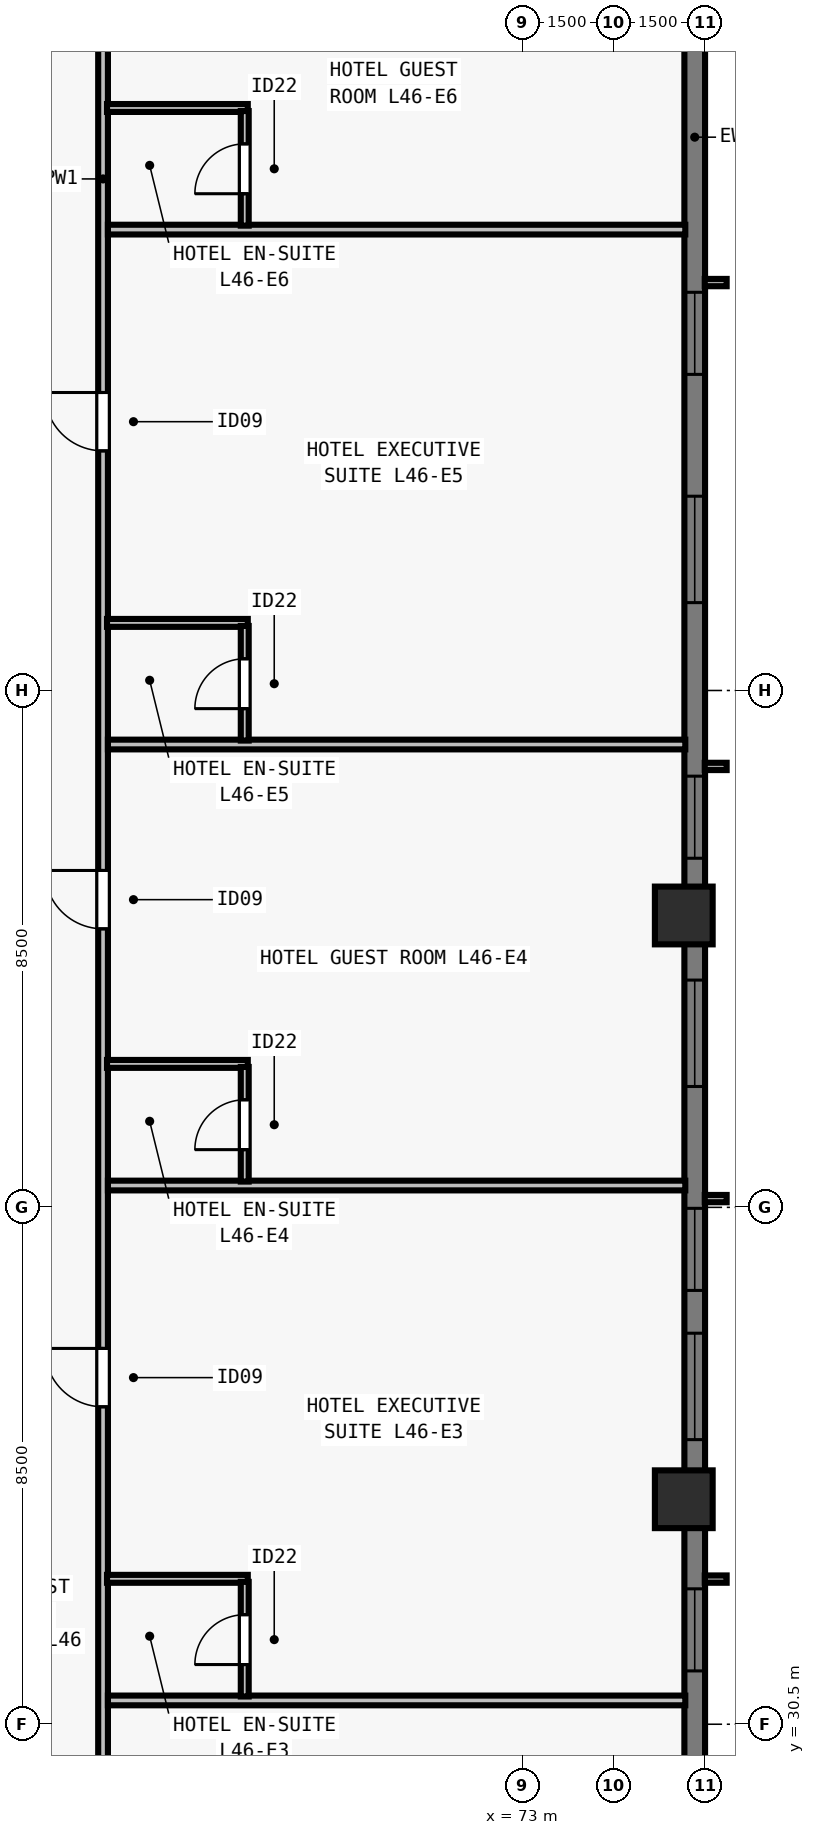
"""IFC4 building model, lengths in metres.
Left out: names, types, materials, properties, quantities, classifications, styles, units other than length and angle.
Written with IfcOpenShell. Run it as: python <this file> out.ifc"""

import sys

from ifc_helpers import new_model, si_unit, direction, frame, frame_2d, origin, origin_2d, place, context, subcontext, project, spatial, rectangle, extrude, element, fill, save


model = new_model("IFC4")
c1 = context("Model", 3, precision=1e-05, world=origin(), true_north=direction((0.0, 1.0)))
c2 = subcontext(c1, "Body", "Model", "MODEL_VIEW")
j1 = project(units=[si_unit("LENGTHUNIT", "METRE"), si_unit("PLANEANGLEUNIT", "RADIAN")], contexts=[c1])
p1 = place(None, origin())
s1 = spatial("IfcSite", under=j1, at=p1, CompositionType="ELEMENT")
p2 = place(p1, origin())
s2 = spatial("IfcBuilding", under=s1, at=p2, CompositionType="ELEMENT")
p3 = place(p2, frame((0.0, 0.0, 169.0)))
s3 = spatial("IfcBuildingStorey", under=s2, at=p3, CompositionType="ELEMENT", Elevation=169.0)
for number, where, z_axis, x_axis in (
    (1, (75.65, 34.2, 0.0), (0.0, 0.0, 1.0), (0.0, 1.0, 0.0)),
    (2, (75.65, 43.8, 0.0), (0.0, 0.0, 1.0), (0.0, 1.0, 0.0)),
):
    element("IfcColumn", number, at=place(p3, frame(where, z_axis=z_axis, x_axis=x_axis)), inside=s3, PredefinedType="COLUMN", context=c2, shape_type="SweptSolid", body=[
        extrude(rectangle(XDim=0.95, YDim=0.95, at=origin_2d()), origin(), (0.0, 0.0, 1.0), 3.5),
    ])
p4 = place(p3, frame((75.83, 59.0, 0.0), z_axis=(0.0, 0.0, 1.0), x_axis=(0.0, -1.0, 0.0)))
e3 = element("IfcWall", 3, at=p4, inside=s3, PredefinedType="SOLIDWALL", context=c2, shape_type="SweptSolid", body=[
    extrude(rectangle(XDim=39.682, YDim=0.34, at=frame_2d((19.841, 0.0))), origin(), (0.0, 0.0, 1.0), 3.28),
])
p5 = place(p4, frame((4.952, 0.0, 0.8)))
e4 = element("IfcOpeningElement", 4, at=p5, cuts=e3, PredefinedType="OPENING", context=c2, shape_type="SweptSolid", body=[
    extrude(rectangle(XDim=1.35, YDim=1.66, at=frame_2d((0.675, 0.83))), frame((0.0, 0.18, 0.0), z_axis=(0.0, -1.0, 0.0), x_axis=(1.0, 0.0, 0.0)), (0.0, 0.0, 1.0), 0.36),
])
p6 = place(p4, frame((8.305, 0.0, 0.8)))
e5 = element("IfcOpeningElement", 5, at=p6, cuts=e3, PredefinedType="OPENING", context=c2, shape_type="SweptSolid", body=[
    extrude(rectangle(XDim=1.75, YDim=1.66, at=frame_2d((0.875, 0.83))), frame((0.0, 0.18, 0.0), z_axis=(0.0, -1.0, 0.0), x_axis=(1.0, 0.0, 0.0)), (0.0, 0.0, 1.0), 0.36),
])
p7 = place(p4, frame((12.909, 0.0, 0.8)))
e6 = element("IfcOpeningElement", 6, at=p7, cuts=e3, PredefinedType="OPENING", context=c2, shape_type="SweptSolid", body=[
    extrude(rectangle(XDim=1.35, YDim=1.66, at=frame_2d((0.675, 0.83))), frame((0.0, 0.18, 0.0), z_axis=(0.0, -1.0, 0.0), x_axis=(1.0, 0.0, 0.0)), (0.0, 0.0, 1.0), 0.36),
])
p8 = place(p4, frame((16.262, 0.0, 0.8)))
e7 = element("IfcOpeningElement", 7, at=p8, cuts=e3, PredefinedType="OPENING", context=c2, shape_type="SweptSolid", body=[
    extrude(rectangle(XDim=1.75, YDim=1.66, at=frame_2d((0.875, 0.83))), frame((0.0, 0.18, 0.0), z_axis=(0.0, -1.0, 0.0), x_axis=(1.0, 0.0, 0.0)), (0.0, 0.0, 1.0), 0.36),
])
p9 = place(p4, frame((20.016, 0.0, 0.8)))
e8 = element("IfcOpeningElement", 8, at=p9, cuts=e3, PredefinedType="OPENING", context=c2, shape_type="SweptSolid", body=[
    extrude(rectangle(XDim=1.35, YDim=1.66, at=frame_2d((0.675, 0.83))), frame((0.0, 0.18, 0.0), z_axis=(0.0, -1.0, 0.0), x_axis=(1.0, 0.0, 0.0)), (0.0, 0.0, 1.0), 0.36),
])
p10 = place(p4, frame((22.07, 0.0, 0.8)))
e9 = element("IfcOpeningElement", 9, at=p10, cuts=e3, PredefinedType="OPENING", context=c2, shape_type="SweptSolid", body=[
    extrude(rectangle(XDim=1.75, YDim=1.66, at=frame_2d((0.875, 0.83))), frame((0.0, 0.18, 0.0), z_axis=(0.0, -1.0, 0.0), x_axis=(1.0, 0.0, 0.0)), (0.0, 0.0, 1.0), 0.36),
])
p11 = place(p4, frame((26.273, 0.0, 0.8)))
e10 = element("IfcOpeningElement", 10, at=p11, cuts=e3, PredefinedType="OPENING", context=c2, shape_type="SweptSolid", body=[
    extrude(rectangle(XDim=1.35, YDim=1.66, at=frame_2d((0.675, 0.83))), frame((0.0, 0.18, 0.0), z_axis=(0.0, -1.0, 0.0), x_axis=(1.0, 0.0, 0.0)), (0.0, 0.0, 1.0), 0.36),
])
p12 = place(p4, frame((29.627, 0.0, 0.8)))
e11 = element("IfcOpeningElement", 11, at=p12, cuts=e3, PredefinedType="OPENING", context=c2, shape_type="SweptSolid", body=[
    extrude(rectangle(XDim=1.75, YDim=1.66, at=frame_2d((0.875, 0.83))), frame((0.0, 0.18, 0.0), z_axis=(0.0, -1.0, 0.0), x_axis=(1.0, 0.0, 0.0)), (0.0, 0.0, 1.0), 0.36),
])
p13 = place(p4, frame((33.38, 0.0, 0.8)))
e12 = element("IfcOpeningElement", 12, at=p13, cuts=e3, PredefinedType="OPENING", context=c2, shape_type="SweptSolid", body=[
    extrude(rectangle(XDim=1.35, YDim=1.66, at=frame_2d((0.675, 0.83))), frame((0.0, 0.18, 0.0), z_axis=(0.0, -1.0, 0.0), x_axis=(1.0, 0.0, 0.0)), (0.0, 0.0, 1.0), 0.36),
])
p14 = place(p4, frame((35.75, 0.0, 0.8)))
e13 = element("IfcOpeningElement", 13, at=p14, cuts=e3, PredefinedType="OPENING", context=c2, shape_type="SweptSolid", body=[
    extrude(rectangle(XDim=0.9, YDim=1.66, at=frame_2d((0.45, 0.83))), frame((0.0, 0.18, 0.0), z_axis=(0.0, -1.0, 0.0), x_axis=(1.0, 0.0, 0.0)), (0.0, 0.0, 1.0), 0.36),
])
p15 = place(p3, frame((66.1, 15.325, 0.0), z_axis=(0.0, 0.0, 1.0), x_axis=(0.0, 1.0, 0.0)))
e14 = element("IfcWall", 14, at=p15, inside=s3, PredefinedType="PARTITIONING", context=c2, shape_type="SweptSolid", body=[
    extrude(rectangle(XDim=47.35, YDim=0.16, at=frame_2d((23.675, 0.0))), origin(), (0.0, 0.0, 1.0), 2.555),
])
p16 = place(p15, frame((5.025, 0.0, 0.0)))
e15 = element("IfcOpeningElement", 15, at=p16, cuts=e14, PredefinedType="OPENING", context=c2, shape_type="SweptSolid", body=[
    extrude(rectangle(XDim=0.96, YDim=2.15, at=frame_2d((0.48, 1.075))), frame((0.0, 0.09, 0.0), z_axis=(0.0, -1.0, 0.0), x_axis=(1.0, 0.0, 0.0)), (0.0, 0.0, 1.0), 0.18),
])
p17 = place(p15, frame((12.535, 0.0, 0.0)))
e16 = element("IfcOpeningElement", 16, at=p17, cuts=e14, PredefinedType="OPENING", context=c2, shape_type="SweptSolid", body=[
    extrude(rectangle(XDim=0.96, YDim=2.15, at=frame_2d((0.48, 1.075))), frame((0.0, 0.09, 0.0), z_axis=(0.0, -1.0, 0.0), x_axis=(1.0, 0.0, 0.0)), (0.0, 0.0, 1.0), 0.18),
])
p18 = place(p15, frame((20.395, 0.0, 0.0)))
e17 = element("IfcOpeningElement", 17, at=p18, cuts=e14, PredefinedType="OPENING", context=c2, shape_type="SweptSolid", body=[
    extrude(rectangle(XDim=0.96, YDim=2.15, at=frame_2d((0.48, 1.075))), frame((0.0, 0.09, 0.0), z_axis=(0.0, -1.0, 0.0), x_axis=(1.0, 0.0, 0.0)), (0.0, 0.0, 1.0), 0.18),
])
p19 = place(p15, frame((28.255, 0.0, 0.0)))
e18 = element("IfcOpeningElement", 18, at=p19, cuts=e14, PredefinedType="OPENING", context=c2, shape_type="SweptSolid", body=[
    extrude(rectangle(XDim=0.96, YDim=2.15, at=frame_2d((0.48, 1.075))), frame((0.0, 0.09, 0.0), z_axis=(0.0, -1.0, 0.0), x_axis=(1.0, 0.0, 0.0)), (0.0, 0.0, 1.0), 0.18),
])
p20 = place(p15, frame((36.115, 0.0, 0.0)))
e19 = element("IfcOpeningElement", 19, at=p20, cuts=e14, PredefinedType="OPENING", context=c2, shape_type="SweptSolid", body=[
    extrude(rectangle(XDim=0.96, YDim=2.15, at=frame_2d((0.48, 1.075))), frame((0.0, 0.09, 0.0), z_axis=(0.0, -1.0, 0.0), x_axis=(1.0, 0.0, 0.0)), (0.0, 0.0, 1.0), 0.18),
])
p21 = place(p15, frame((44.1, 0.0, 0.0)))
e20 = element("IfcOpeningElement", 20, at=p21, cuts=e14, PredefinedType="OPENING", context=c2, shape_type="SweptSolid", body=[
    extrude(rectangle(XDim=0.96, YDim=2.15, at=frame_2d((0.48, 1.075))), frame((0.0, 0.09, 0.0), z_axis=(0.0, -1.0, 0.0), x_axis=(1.0, 0.0, 0.0)), (0.0, 0.0, 1.0), 0.18),
])
p22 = place(p3, frame((66.18, 30.891, 0.0), z_axis=(0.0, 0.0, 1.0), x_axis=(1.0, 0.0, 0.0)))
e21 = element("IfcWall", 21, at=p22, inside=s3, PredefinedType="PARTITIONING", context=c2, shape_type="SweptSolid", body=[
    extrude(rectangle(XDim=9.495, YDim=0.16, at=frame_2d((4.748, 0.0))), origin(), (0.0, 0.0, 1.0), 3.28),
])
p23 = place(p3, frame((66.165, 32.891, 0.0), z_axis=(0.0, 0.0, 1.0), x_axis=(1.0, 0.0, 0.0)))
e22 = element("IfcWall", 22, at=p23, inside=s3, PredefinedType="PLUMBINGWALL", context=c2, shape_type="SweptSolid", body=[
    extrude(rectangle(XDim=2.315, YDim=0.13, at=frame_2d((1.157, 0.0))), origin(), (0.0, 0.0, 1.0), 3.28),
])
p24 = place(p3, frame((68.43, 30.956, 0.0), z_axis=(0.0, 0.0, 1.0), x_axis=(0.0, 1.0, 0.0)))
e23 = element("IfcWall", 23, at=p24, inside=s3, PredefinedType="PLUMBINGWALL", context=c2, shape_type="SweptSolid", body=[
    extrude(rectangle(XDim=1.885, YDim=0.13, at=frame_2d((0.942, 0.0))), origin(), (0.0, 0.0, 1.0), 3.28),
])
p25 = place(p24, frame((0.525, 0.0, 0.0)))
e24 = element("IfcOpeningElement", 24, at=p25, cuts=e23, PredefinedType="OPENING", context=c2, shape_type="SweptSolid", body=[
    extrude(rectangle(XDim=0.82, YDim=2.1, at=frame_2d((0.41, 1.05))), frame((0.0, 0.075, 0.0), z_axis=(0.0, -1.0, 0.0), x_axis=(1.0, 0.0, 0.0)), (0.0, 0.0, 1.0), 0.15),
])
p26 = place(p3, frame((66.18, 39.359, 0.0), z_axis=(0.0, 0.0, 1.0), x_axis=(1.0, 0.0, 0.0)))
e25 = element("IfcWall", 25, at=p26, inside=s3, PredefinedType="PARTITIONING", context=c2, shape_type="SweptSolid", body=[
    extrude(rectangle(XDim=9.495, YDim=0.16, at=frame_2d((4.748, 0.0))), origin(), (0.0, 0.0, 1.0), 3.28),
])
p27 = place(p3, frame((66.165, 41.359, 0.0), z_axis=(0.0, 0.0, 1.0), x_axis=(1.0, 0.0, 0.0)))
e26 = element("IfcWall", 26, at=p27, inside=s3, PredefinedType="PLUMBINGWALL", context=c2, shape_type="SweptSolid", body=[
    extrude(rectangle(XDim=2.315, YDim=0.13, at=frame_2d((1.157, 0.0))), origin(), (0.0, 0.0, 1.0), 3.28),
])
p28 = place(p3, frame((68.43, 39.424, 0.0), z_axis=(0.0, 0.0, 1.0), x_axis=(0.0, 1.0, 0.0)))
e27 = element("IfcWall", 27, at=p28, inside=s3, PredefinedType="PLUMBINGWALL", context=c2, shape_type="SweptSolid", body=[
    extrude(rectangle(XDim=1.885, YDim=0.13, at=frame_2d((0.942, 0.0))), origin(), (0.0, 0.0, 1.0), 3.28),
])
p29 = place(p28, frame((0.525, 0.0, 0.0)))
e28 = element("IfcOpeningElement", 28, at=p29, cuts=e27, PredefinedType="OPENING", context=c2, shape_type="SweptSolid", body=[
    extrude(rectangle(XDim=0.82, YDim=2.1, at=frame_2d((0.41, 1.05))), frame((0.0, 0.075, 0.0), z_axis=(0.0, -1.0, 0.0), x_axis=(1.0, 0.0, 0.0)), (0.0, 0.0, 1.0), 0.15),
])
p30 = place(p3, frame((66.18, 46.611, 0.0), z_axis=(0.0, 0.0, 1.0), x_axis=(1.0, 0.0, 0.0)))
e29 = element("IfcWall", 29, at=p30, inside=s3, PredefinedType="PARTITIONING", context=c2, shape_type="SweptSolid", body=[
    extrude(rectangle(XDim=9.495, YDim=0.16, at=frame_2d((4.748, 0.0))), origin(), (0.0, 0.0, 1.0), 3.28),
])
p31 = place(p3, frame((66.165, 48.611, 0.0), z_axis=(0.0, 0.0, 1.0), x_axis=(1.0, 0.0, 0.0)))
e30 = element("IfcWall", 30, at=p31, inside=s3, PredefinedType="PLUMBINGWALL", context=c2, shape_type="SweptSolid", body=[
    extrude(rectangle(XDim=2.315, YDim=0.13, at=frame_2d((1.157, 0.0))), origin(), (0.0, 0.0, 1.0), 3.28),
])
p32 = place(p3, frame((68.43, 46.677, 0.0), z_axis=(0.0, 0.0, 1.0), x_axis=(0.0, 1.0, 0.0)))
e31 = element("IfcWall", 31, at=p32, inside=s3, PredefinedType="PLUMBINGWALL", context=c2, shape_type="SweptSolid", body=[
    extrude(rectangle(XDim=1.885, YDim=0.13, at=frame_2d((0.942, 0.0))), origin(), (0.0, 0.0, 1.0), 3.28),
])
p33 = place(p32, frame((0.525, 0.0, 0.0)))
e32 = element("IfcOpeningElement", 32, at=p33, cuts=e31, PredefinedType="OPENING", context=c2, shape_type="SweptSolid", body=[
    extrude(rectangle(XDim=0.82, YDim=2.1, at=frame_2d((0.41, 1.05))), frame((0.0, 0.075, 0.0), z_axis=(0.0, -1.0, 0.0), x_axis=(1.0, 0.0, 0.0)), (0.0, 0.0, 1.0), 0.15),
])
p34 = place(p3, frame((66.18, 55.079, 0.0), z_axis=(0.0, 0.0, 1.0), x_axis=(1.0, 0.0, 0.0)))
e33 = element("IfcWall", 33, at=p34, inside=s3, PredefinedType="PARTITIONING", context=c2, shape_type="SweptSolid", body=[
    extrude(rectangle(XDim=9.495, YDim=0.16, at=frame_2d((4.748, 0.0))), origin(), (0.0, 0.0, 1.0), 2.896),
])
p35 = place(p3, frame((66.165, 57.079, 0.0), z_axis=(0.0, 0.0, 1.0), x_axis=(1.0, 0.0, 0.0)))
e34 = element("IfcWall", 34, at=p35, inside=s3, PredefinedType="PLUMBINGWALL", context=c2, shape_type="SweptSolid", body=[
    extrude(rectangle(XDim=2.315, YDim=0.13, at=frame_2d((1.157, 0.0))), origin(), (0.0, 0.0, 1.0), 3.28),
])
p36 = place(p3, frame((68.43, 55.144, 0.0), z_axis=(0.0, 0.0, 1.0), x_axis=(0.0, 1.0, 0.0)))
e35 = element("IfcWall", 35, at=p36, inside=s3, PredefinedType="PLUMBINGWALL", context=c2, shape_type="SweptSolid", body=[
    extrude(rectangle(XDim=1.885, YDim=0.13, at=frame_2d((0.942, 0.0))), origin(), (0.0, 0.0, 1.0), 3.28),
])
p37 = place(p36, frame((0.525, 0.0, 0.0)))
e36 = element("IfcOpeningElement", 36, at=p37, cuts=e35, PredefinedType="OPENING", context=c2, shape_type="SweptSolid", body=[
    extrude(rectangle(XDim=0.82, YDim=2.1, at=frame_2d((0.41, 1.05))), frame((0.0, 0.075, 0.0), z_axis=(0.0, -1.0, 0.0), x_axis=(1.0, 0.0, 0.0)), (0.0, 0.0, 1.0), 0.15),
])
p38 = place(p5, origin())
e37 = element("IfcWindow", 37, at=p38, inside=s3, PartitioningType="SINGLE_PANEL", PredefinedType="WINDOW", context=c2, shape_type="SweptSolid", body=[
    extrude(rectangle(XDim=1.35, YDim=1.66, at=frame_2d((0.675, 0.83))), frame((0.0, -0.05, 0.0), z_axis=(0.0, -1.0, 0.0), x_axis=(1.0, 0.0, 0.0)), (0.0, 0.0, 1.0), 0.06),
])
fill(e4, e37)
p39 = place(p6, origin())
e38 = element("IfcWindow", 38, at=p39, inside=s3, PartitioningType="SINGLE_PANEL", PredefinedType="WINDOW", context=c2, shape_type="SweptSolid", body=[
    extrude(rectangle(XDim=1.75, YDim=1.66, at=frame_2d((0.875, 0.83))), frame((0.0, -0.05, 0.0), z_axis=(0.0, -1.0, 0.0), x_axis=(1.0, 0.0, 0.0)), (0.0, 0.0, 1.0), 0.06),
])
fill(e5, e38)
p40 = place(p7, origin())
e39 = element("IfcWindow", 39, at=p40, inside=s3, PartitioningType="SINGLE_PANEL", PredefinedType="WINDOW", context=c2, shape_type="SweptSolid", body=[
    extrude(rectangle(XDim=1.35, YDim=1.66, at=frame_2d((0.675, 0.83))), frame((0.0, -0.05, 0.0), z_axis=(0.0, -1.0, 0.0), x_axis=(1.0, 0.0, 0.0)), (0.0, 0.0, 1.0), 0.06),
])
fill(e6, e39)
p41 = place(p8, origin())
e40 = element("IfcWindow", 40, at=p41, inside=s3, PartitioningType="SINGLE_PANEL", PredefinedType="WINDOW", context=c2, shape_type="SweptSolid", body=[
    extrude(rectangle(XDim=1.75, YDim=1.66, at=frame_2d((0.875, 0.83))), frame((0.0, -0.05, 0.0), z_axis=(0.0, -1.0, 0.0), x_axis=(1.0, 0.0, 0.0)), (0.0, 0.0, 1.0), 0.06),
])
fill(e7, e40)
p42 = place(p9, origin())
e41 = element("IfcWindow", 41, at=p42, inside=s3, PartitioningType="SINGLE_PANEL", PredefinedType="WINDOW", context=c2, shape_type="SweptSolid", body=[
    extrude(rectangle(XDim=1.35, YDim=1.66, at=frame_2d((0.675, 0.83))), frame((0.0, -0.05, 0.0), z_axis=(0.0, -1.0, 0.0), x_axis=(1.0, 0.0, 0.0)), (0.0, 0.0, 1.0), 0.06),
])
fill(e8, e41)
p43 = place(p10, origin())
e42 = element("IfcWindow", 42, at=p43, inside=s3, PartitioningType="SINGLE_PANEL", PredefinedType="WINDOW", context=c2, shape_type="SweptSolid", body=[
    extrude(rectangle(XDim=1.75, YDim=1.66, at=frame_2d((0.875, 0.83))), frame((0.0, -0.05, 0.0), z_axis=(0.0, -1.0, 0.0), x_axis=(1.0, 0.0, 0.0)), (0.0, 0.0, 1.0), 0.06),
])
fill(e9, e42)
p44 = place(p11, origin())
e43 = element("IfcWindow", 43, at=p44, inside=s3, PartitioningType="SINGLE_PANEL", PredefinedType="WINDOW", context=c2, shape_type="SweptSolid", body=[
    extrude(rectangle(XDim=1.35, YDim=1.66, at=frame_2d((0.675, 0.83))), frame((0.0, -0.05, 0.0), z_axis=(0.0, -1.0, 0.0), x_axis=(1.0, 0.0, 0.0)), (0.0, 0.0, 1.0), 0.06),
])
fill(e10, e43)
p45 = place(p25, origin())
e44 = element("IfcDoor", 44, at=p45, inside=s3, OperationType="SINGLE_SWING_LEFT", PredefinedType="DOOR", context=c2, shape_type="SweptSolid", body=[
    extrude(rectangle(XDim=0.82, YDim=2.1, at=frame_2d((0.41, 1.05))), frame((0.0, 0.025, 0.0), z_axis=(0.0, -1.0, 0.0), x_axis=(1.0, 0.0, 0.0)), (0.0, 0.0, 1.0), 0.05),
])
fill(e24, e44)
p46 = place(p18, origin())
e45 = element("IfcDoor", 45, at=p46, inside=s3, OperationType="SINGLE_SWING_RIGHT", PredefinedType="DOOR", context=c2, shape_type="SweptSolid", body=[
    extrude(rectangle(XDim=0.96, YDim=2.15, at=frame_2d((0.48, 1.075))), frame((0.0, 0.025, 0.0), z_axis=(0.0, -1.0, 0.0), x_axis=(1.0, 0.0, 0.0)), (0.0, 0.0, 1.0), 0.05),
])
fill(e17, e45)
p47 = place(p29, origin())
e46 = element("IfcDoor", 46, at=p47, inside=s3, OperationType="SINGLE_SWING_LEFT", PredefinedType="DOOR", context=c2, shape_type="SweptSolid", body=[
    extrude(rectangle(XDim=0.82, YDim=2.1, at=frame_2d((0.41, 1.05))), frame((0.0, 0.025, 0.0), z_axis=(0.0, -1.0, 0.0), x_axis=(1.0, 0.0, 0.0)), (0.0, 0.0, 1.0), 0.05),
])
fill(e28, e46)
p48 = place(p19, origin())
e47 = element("IfcDoor", 47, at=p48, inside=s3, OperationType="SINGLE_SWING_RIGHT", PredefinedType="DOOR", context=c2, shape_type="SweptSolid", body=[
    extrude(rectangle(XDim=0.96, YDim=2.15, at=frame_2d((0.48, 1.075))), frame((0.0, 0.025, 0.0), z_axis=(0.0, -1.0, 0.0), x_axis=(1.0, 0.0, 0.0)), (0.0, 0.0, 1.0), 0.05),
])
fill(e18, e47)
p49 = place(p33, origin())
e48 = element("IfcDoor", 48, at=p49, inside=s3, OperationType="SINGLE_SWING_LEFT", PredefinedType="DOOR", context=c2, shape_type="SweptSolid", body=[
    extrude(rectangle(XDim=0.82, YDim=2.1, at=frame_2d((0.41, 1.05))), frame((0.0, 0.025, 0.0), z_axis=(0.0, -1.0, 0.0), x_axis=(1.0, 0.0, 0.0)), (0.0, 0.0, 1.0), 0.05),
])
fill(e32, e48)
p50 = place(p20, origin())
e49 = element("IfcDoor", 49, at=p50, inside=s3, OperationType="SINGLE_SWING_RIGHT", PredefinedType="DOOR", context=c2, shape_type="SweptSolid", body=[
    extrude(rectangle(XDim=0.96, YDim=2.15, at=frame_2d((0.48, 1.075))), frame((0.0, 0.025, 0.0), z_axis=(0.0, -1.0, 0.0), x_axis=(1.0, 0.0, 0.0)), (0.0, 0.0, 1.0), 0.05),
])
fill(e19, e49)
p51 = place(p37, origin())
e50 = element("IfcDoor", 50, at=p51, inside=s3, OperationType="SINGLE_SWING_LEFT", PredefinedType="DOOR", context=c2, shape_type="SweptSolid", body=[
    extrude(rectangle(XDim=0.82, YDim=2.1, at=frame_2d((0.41, 1.05))), frame((0.0, 0.025, 0.0), z_axis=(0.0, -1.0, 0.0), x_axis=(1.0, 0.0, 0.0)), (0.0, 0.0, 1.0), 0.05),
])
fill(e36, e50)
save(model, sys.argv[1])
